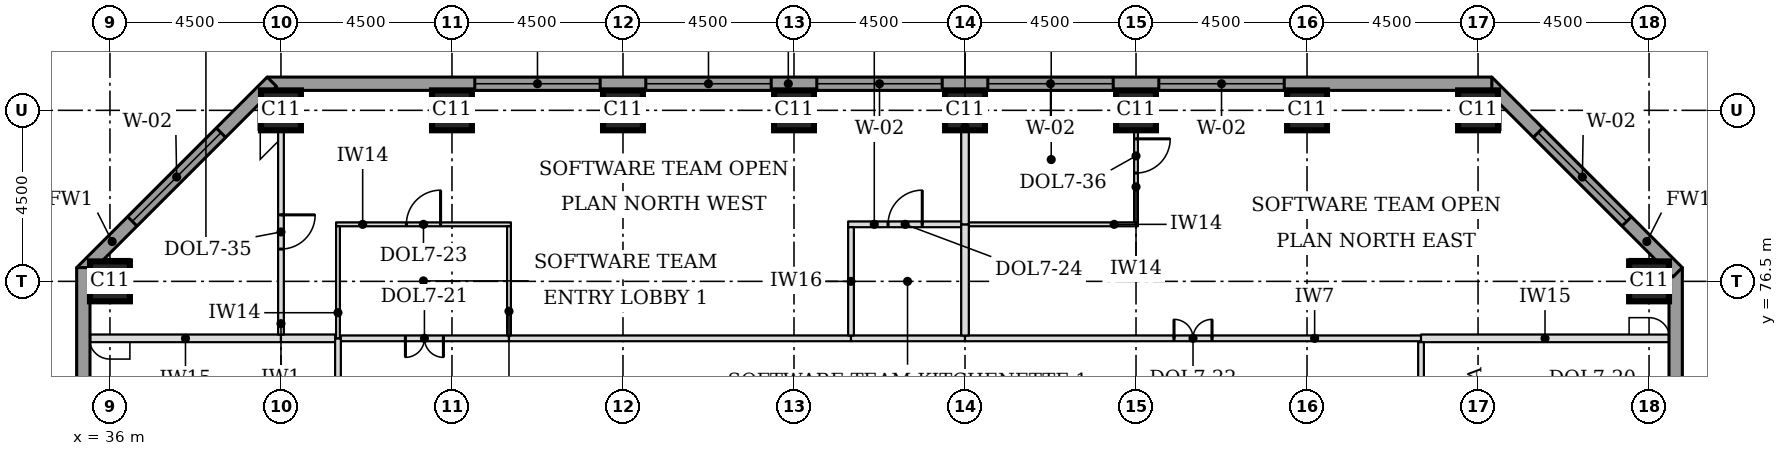
"""IFC4 building model, lengths in metres.
Left out: names, types, materials, properties, quantities, classifications, styles, units other than length and angle.
Written with IfcOpenShell. Run it as: python <this file> out.ifc"""

import sys

from ifc_helpers import new_model, si_unit, direction, frame, frame_2d, origin, origin_2d, place, context, subcontext, project, spatial, rectangle, extrude, element, fill, save


model = new_model("IFC4")
c1 = context("Model", 3, precision=1e-05, world=origin(), true_north=direction((0.0, 1.0)))
c2 = subcontext(c1, "Body", "Model", "MODEL_VIEW")
j1 = project(units=[si_unit("LENGTHUNIT", "METRE"), si_unit("PLANEANGLEUNIT", "RADIAN")], contexts=[c1])
p1 = place(None, origin())
s1 = spatial("IfcSite", under=j1, at=p1, CompositionType="ELEMENT")
p2 = place(p1, origin())
s2 = spatial("IfcBuilding", under=s1, at=p2, CompositionType="ELEMENT")
p3 = place(p2, frame((0.0, 0.0, 127.0)))
s3 = spatial("IfcBuildingStorey", under=s2, at=p3, CompositionType="ELEMENT", Elevation=127.0)
for number, where, z_axis, x_axis in (
    (1, (36.0, 76.5, 0.0), (0.0, 0.0, 1.0), (1.0, 0.0, 0.0)),
    (2, (76.5, 76.5, 0.0), (0.0, 0.0, 1.0), (1.0, 0.0, 0.0)),
    (3, (40.5, 81.0, 0.0), (0.0, 0.0, 1.0), (1.0, 0.0, 0.0)),
    (4, (45.0, 81.0, 0.0), (0.0, 0.0, 1.0), (1.0, 0.0, 0.0)),
    (5, (49.5, 81.0, 0.0), (0.0, 0.0, 1.0), (1.0, 0.0, 0.0)),
    (6, (54.0, 81.0, 0.0), (0.0, 0.0, 1.0), (1.0, 0.0, 0.0)),
    (7, (58.5, 81.0, 0.0), (0.0, 0.0, 1.0), (1.0, 0.0, 0.0)),
    (8, (63.0, 81.0, 0.0), (0.0, 0.0, 1.0), (1.0, 0.0, 0.0)),
    (9, (67.5, 81.0, 0.0), (0.0, 0.0, 1.0), (1.0, 0.0, 0.0)),
    (10, (72.0, 81.0, 0.0), (0.0, 0.0, 1.0), (1.0, 0.0, 0.0)),
):
    element("IfcColumn", number, at=place(p3, frame(where, z_axis=z_axis, x_axis=x_axis)), inside=s3, PredefinedType="COLUMN", context=c2, shape_type="SweptSolid", body=[
        extrude(rectangle(XDim=1.05, YDim=1.05, at=origin_2d()), origin(), (0.0, 0.0, 1.0), 3.7),
    ])
p4 = place(p3, frame((77.2, 44.638, 0.0), z_axis=(0.0, 0.0, 1.0), x_axis=(0.0, 1.0, 0.0)))
e11 = element("IfcWall", 11, at=p4, inside=s3, PredefinedType="STANDARD", context=c2, shape_type="SweptSolid", body=[
    extrude(rectangle(XDim=32.225, YDim=0.35, at=frame_2d((16.112, 0.0))), origin(), (0.0, 0.0, 1.0), 3.525),
])
p5 = place(p4, frame((5.462, 0.0, 0.9)))
e12 = element("IfcOpeningElement", 12, at=p5, cuts=e11, PredefinedType="OPENING", context=c2, shape_type="SweptSolid", body=[
    extrude(rectangle(XDim=3.3, YDim=1.9, at=frame_2d((1.65, 0.95))), frame((0.0, 0.185, 0.0), z_axis=(0.0, -1.0, 0.0), x_axis=(1.0, 0.0, 0.0)), (0.0, 0.0, 1.0), 0.37),
])
p6 = place(p4, frame((9.962, 0.0, 0.9)))
e13 = element("IfcOpeningElement", 13, at=p6, cuts=e11, PredefinedType="OPENING", context=c2, shape_type="SweptSolid", body=[
    extrude(rectangle(XDim=3.3, YDim=1.9, at=frame_2d((1.65, 0.95))), frame((0.0, 0.185, 0.0), z_axis=(0.0, -1.0, 0.0), x_axis=(1.0, 0.0, 0.0)), (0.0, 0.0, 1.0), 0.37),
])
p7 = place(p4, frame((14.462, 0.0, 0.9)))
e14 = element("IfcOpeningElement", 14, at=p7, cuts=e11, PredefinedType="OPENING", context=c2, shape_type="SweptSolid", body=[
    extrude(rectangle(XDim=3.3, YDim=1.9, at=frame_2d((1.65, 0.95))), frame((0.0, 0.185, 0.0), z_axis=(0.0, -1.0, 0.0), x_axis=(1.0, 0.0, 0.0)), (0.0, 0.0, 1.0), 0.37),
])
p8 = place(p4, frame((18.962, 0.0, 0.9)))
e15 = element("IfcOpeningElement", 15, at=p8, cuts=e11, PredefinedType="OPENING", context=c2, shape_type="SweptSolid", body=[
    extrude(rectangle(XDim=3.3, YDim=1.9, at=frame_2d((1.65, 0.95))), frame((0.0, 0.185, 0.0), z_axis=(0.0, -1.0, 0.0), x_axis=(1.0, 0.0, 0.0)), (0.0, 0.0, 1.0), 0.37),
])
p9 = place(p4, frame((23.462, 0.0, 0.9)))
e16 = element("IfcOpeningElement", 16, at=p9, cuts=e11, PredefinedType="OPENING", context=c2, shape_type="SweptSolid", body=[
    extrude(rectangle(XDim=3.3, YDim=1.9, at=frame_2d((1.65, 0.95))), frame((0.0, 0.185, 0.0), z_axis=(0.0, -1.0, 0.0), x_axis=(1.0, 0.0, 0.0)), (0.0, 0.0, 1.0), 0.37),
])
p10 = place(p3, frame((77.251, 76.739, 0.0), z_axis=(0.0, 0.0, 1.0), x_axis=(-0.707106781187, 0.707106781187, 0.0)))
e17 = element("IfcWall", 17, at=p10, inside=s3, PredefinedType="STANDARD", context=c2, shape_type="SweptSolid", body=[
    extrude(rectangle(XDim=7.089, YDim=0.35, at=frame_2d((3.544, 0.0))), origin(), (0.0, 0.0, 1.0), 3.525),
])
p11 = place(p10, frame((1.894, 0.0, 0.9)))
e18 = element("IfcOpeningElement", 18, at=p11, cuts=e17, PredefinedType="OPENING", context=c2, shape_type="SweptSolid", body=[
    extrude(rectangle(XDim=3.3, YDim=1.9, at=frame_2d((1.65, 0.95))), frame((0.0, 0.185, 0.0), z_axis=(0.0, -1.0, 0.0), x_axis=(1.0, 0.0, 0.0)), (0.0, 0.0, 1.0), 0.37),
])
p12 = place(p3, frame((72.362, 81.7, 0.0), z_axis=(0.0, 0.0, 1.0), x_axis=(-1.0, 0.0, 0.0)))
e19 = element("IfcWall", 19, at=p12, inside=s3, PredefinedType="STANDARD", context=c2, shape_type="SweptSolid", body=[
    extrude(rectangle(XDim=32.225, YDim=0.35, at=frame_2d((16.112, 0.0))), origin(), (0.0, 0.0, 1.0), 3.525),
])
p13 = place(p12, frame((5.462, 0.0, 0.9)))
e20 = element("IfcOpeningElement", 20, at=p13, cuts=e19, PredefinedType="OPENING", context=c2, shape_type="SweptSolid", body=[
    extrude(rectangle(XDim=3.3, YDim=1.9, at=frame_2d((1.65, 0.95))), frame((0.0, 0.185, 0.0), z_axis=(0.0, -1.0, 0.0), x_axis=(1.0, 0.0, 0.0)), (0.0, 0.0, 1.0), 0.37),
])
p14 = place(p12, frame((9.962, 0.0, 0.9)))
e21 = element("IfcOpeningElement", 21, at=p14, cuts=e19, PredefinedType="OPENING", context=c2, shape_type="SweptSolid", body=[
    extrude(rectangle(XDim=3.3, YDim=1.9, at=frame_2d((1.65, 0.95))), frame((0.0, 0.185, 0.0), z_axis=(0.0, -1.0, 0.0), x_axis=(1.0, 0.0, 0.0)), (0.0, 0.0, 1.0), 0.37),
])
p15 = place(p12, frame((14.462, 0.0, 0.9)))
e22 = element("IfcOpeningElement", 22, at=p15, cuts=e19, PredefinedType="OPENING", context=c2, shape_type="SweptSolid", body=[
    extrude(rectangle(XDim=3.3, YDim=1.9, at=frame_2d((1.65, 0.95))), frame((0.0, 0.185, 0.0), z_axis=(0.0, -1.0, 0.0), x_axis=(1.0, 0.0, 0.0)), (0.0, 0.0, 1.0), 0.37),
])
p16 = place(p12, frame((18.962, 0.0, 0.9)))
e23 = element("IfcOpeningElement", 23, at=p16, cuts=e19, PredefinedType="OPENING", context=c2, shape_type="SweptSolid", body=[
    extrude(rectangle(XDim=3.3, YDim=1.9, at=frame_2d((1.65, 0.95))), frame((0.0, 0.185, 0.0), z_axis=(0.0, -1.0, 0.0), x_axis=(1.0, 0.0, 0.0)), (0.0, 0.0, 1.0), 0.37),
])
p17 = place(p12, frame((23.462, 0.0, 0.9)))
e24 = element("IfcOpeningElement", 24, at=p17, cuts=e19, PredefinedType="OPENING", context=c2, shape_type="SweptSolid", body=[
    extrude(rectangle(XDim=3.3, YDim=1.9, at=frame_2d((1.65, 0.95))), frame((0.0, 0.185, 0.0), z_axis=(0.0, -1.0, 0.0), x_axis=(1.0, 0.0, 0.0)), (0.0, 0.0, 1.0), 0.37),
])
p18 = place(p3, frame((40.261, 81.751, 0.0), z_axis=(0.0, 0.0, 1.0), x_axis=(-0.707106781187, -0.707106781187, 0.0)))
e25 = element("IfcWall", 25, at=p18, inside=s3, PredefinedType="STANDARD", context=c2, shape_type="SweptSolid", body=[
    extrude(rectangle(XDim=7.089, YDim=0.35, at=frame_2d((3.544, 0.0))), origin(), (0.0, 0.0, 1.0), 3.525),
])
p19 = place(p18, frame((1.894, 0.0, 0.9)))
e26 = element("IfcOpeningElement", 26, at=p19, cuts=e25, PredefinedType="OPENING", context=c2, shape_type="SweptSolid", body=[
    extrude(rectangle(XDim=3.3, YDim=1.9, at=frame_2d((1.65, 0.95))), frame((0.0, 0.185, 0.0), z_axis=(0.0, -1.0, 0.0), x_axis=(1.0, 0.0, 0.0)), (0.0, 0.0, 1.0), 0.37),
])
p20 = place(p3, frame((35.3, 76.862, 0.0), z_axis=(0.0, 0.0, 1.0), x_axis=(0.0, -1.0, 0.0)))
e27 = element("IfcWall", 27, at=p20, inside=s3, PredefinedType="STANDARD", context=c2, shape_type="SweptSolid", body=[
    extrude(rectangle(XDim=13.337, YDim=0.35, at=frame_2d((6.669, 0.0))), origin(), (0.0, 0.0, 1.0), 3.525),
])
p21 = place(p20, frame((9.537, 0.0, 0.9)))
e28 = element("IfcOpeningElement", 28, at=p21, cuts=e27, PredefinedType="OPENING", context=c2, shape_type="SweptSolid", body=[
    extrude(rectangle(XDim=3.3, YDim=1.9, at=frame_2d((1.65, 0.95))), frame((0.0, 0.185, 0.0), z_axis=(0.0, -1.0, 0.0), x_axis=(1.0, 0.0, 0.0)), (0.0, 0.0, 1.0), 0.37),
])
p22 = place(p3, frame((35.475, 75.0, 0.0), z_axis=(0.0, 0.0, 1.0), x_axis=(1.0, 0.0, 0.0)))
e29 = element("IfcWall", 29, at=p22, inside=s3, PredefinedType="PARTITIONING", context=c2, shape_type="SweptSolid", body=[
    extrude(rectangle(XDim=5.025, YDim=0.2, at=frame_2d((2.512, 0.0))), origin(), (0.0, 0.0, 1.0), 3.55),
])
p23 = place(p3, frame((40.5, 75.0, 0.0), z_axis=(0.0, 0.0, 1.0), x_axis=(1.0, 0.0, 0.0)))
e30 = element("IfcWall", 30, at=p23, inside=s3, PredefinedType="PARTITIONING", context=c2, shape_type="SweptSolid", body=[
    extrude(rectangle(XDim=1.425, YDim=0.2, at=frame_2d((0.712, 0.0))), origin(), (0.0, 0.0, 1.0), 3.55),
])
p24 = place(p3, frame((42.075, 75.0, 0.0), z_axis=(0.0, 0.0, 1.0), x_axis=(1.0, 0.0, 0.0)))
e31 = element("IfcWall", 31, at=p24, inside=s3, PredefinedType="PARTITIONING", context=c2, shape_type="SweptSolid", body=[
    extrude(rectangle(XDim=4.425, YDim=0.15, at=frame_2d((2.212, 0.0))), origin(), (0.0, 0.0, 1.0), 3.55),
])
p25 = place(p24, frame((1.7, 0.0, 0.0)))
e32 = element("IfcOpeningElement", 32, at=p25, cuts=e31, PredefinedType="OPENING", context=c2, shape_type="SweptSolid", body=[
    extrude(rectangle(XDim=1.0, YDim=2.1, at=frame_2d((0.5, 1.05))), frame((0.0, 0.085, 0.0), z_axis=(0.0, -1.0, 0.0), x_axis=(1.0, 0.0, 0.0)), (0.0, 0.0, 1.0), 0.17),
])
p26 = place(p3, frame((46.5, 75.0, 0.0), z_axis=(0.0, 0.0, 1.0), x_axis=(1.0, 0.0, 0.0)))
e33 = element("IfcWall", 33, at=p26, inside=s3, PredefinedType="PARTITIONING", context=c2, shape_type="SweptSolid", body=[
    extrude(rectangle(XDim=9.0, YDim=0.15, at=frame_2d((4.5, 0.0))), origin(), (0.0, 0.0, 1.0), 3.55),
])
p27 = place(p3, frame((55.5, 75.0, 0.0), z_axis=(0.0, 0.0, 1.0), x_axis=(1.0, 0.0, 0.0)))
e34 = element("IfcWall", 34, at=p27, inside=s3, PredefinedType="PARTITIONING", context=c2, shape_type="SweptSolid", body=[
    extrude(rectangle(XDim=3.0, YDim=0.15, at=frame_2d((1.5, 0.0))), origin(), (0.0, 0.0, 1.0), 3.55),
])
p28 = place(p3, frame((58.5, 75.0, 0.0), z_axis=(0.0, 0.0, 1.0), x_axis=(1.0, 0.0, 0.0)))
e35 = element("IfcWall", 35, at=p28, inside=s3, PredefinedType="PARTITIONING", context=c2, shape_type="SweptSolid", body=[
    extrude(rectangle(XDim=12.0, YDim=0.15, at=frame_2d((6.0, 0.0))), origin(), (0.0, 0.0, 1.0), 3.55),
])
p29 = place(p28, frame((5.5, 0.0, 0.0)))
e36 = element("IfcOpeningElement", 36, at=p29, cuts=e35, PredefinedType="OPENING", context=c2, shape_type="SweptSolid", body=[
    extrude(rectangle(XDim=1.0, YDim=2.1, at=frame_2d((0.5, 1.05))), frame((0.0, 0.085, 0.0), z_axis=(0.0, -1.0, 0.0), x_axis=(1.0, 0.0, 0.0)), (0.0, 0.0, 1.0), 0.17),
])
p30 = place(p3, frame((70.5, 75.0, 0.0), z_axis=(0.0, 0.0, 1.0), x_axis=(1.0, 0.0, 0.0)))
e37 = element("IfcWall", 37, at=p30, inside=s3, PredefinedType="PARTITIONING", context=c2, shape_type="SweptSolid", body=[
    extrude(rectangle(XDim=6.525, YDim=0.2, at=frame_2d((3.262, 0.0))), origin(), (0.0, 0.0, 1.0), 3.55),
])
p31 = place(p3, frame((41.95, 78.0, 0.0), z_axis=(0.0, 0.0, 1.0), x_axis=(1.0, 0.0, 0.0)))
e38 = element("IfcWall", 38, at=p31, inside=s3, PredefinedType="PARTITIONING", context=c2, shape_type="SweptSolid", body=[
    extrude(rectangle(XDim=4.6, YDim=0.1, at=frame_2d((2.3, 0.0))), origin(), (0.0, 0.0, 1.0), 3.55),
])
p32 = place(p31, frame((1.85, 0.0, 0.0)))
e39 = element("IfcOpeningElement", 39, at=p32, cuts=e38, PredefinedType="OPENING", context=c2, shape_type="SweptSolid", body=[
    extrude(rectangle(XDim=0.9, YDim=2.1, at=frame_2d((0.45, 1.05))), frame((0.0, 0.06, 0.0), z_axis=(0.0, -1.0, 0.0), x_axis=(1.0, 0.0, 0.0)), (0.0, 0.0, 1.0), 0.12),
])
p33 = place(p3, frame((55.425, 78.0, 0.0), z_axis=(0.0, 0.0, 1.0), x_axis=(1.0, 0.0, 0.0)))
e40 = element("IfcWall", 40, at=p33, inside=s3, PredefinedType="PARTITIONING", context=c2, shape_type="SweptSolid", body=[
    extrude(rectangle(XDim=2.975, YDim=0.15, at=frame_2d((1.487, 0.0))), origin(), (0.0, 0.0, 1.0), 3.55),
])
p34 = place(p33, frame((1.05, 0.0, 0.0)))
e41 = element("IfcOpeningElement", 41, at=p34, cuts=e40, PredefinedType="OPENING", context=c2, shape_type="SweptSolid", body=[
    extrude(rectangle(XDim=0.9, YDim=2.1, at=frame_2d((0.45, 1.05))), frame((0.0, 0.085, 0.0), z_axis=(0.0, -1.0, 0.0), x_axis=(1.0, 0.0, 0.0)), (0.0, 0.0, 1.0), 0.17),
])
p35 = place(p3, frame((58.6, 78.0, 0.0), z_axis=(0.0, 0.0, 1.0), x_axis=(1.0, 0.0, 0.0)))
e42 = element("IfcWall", 42, at=p35, inside=s3, PredefinedType="PARTITIONING", context=c2, shape_type="SweptSolid", body=[
    extrude(rectangle(XDim=4.45, YDim=0.1, at=frame_2d((2.225, 0.0))), origin(), (0.0, 0.0, 1.0), 3.55),
])
p36 = place(p3, frame((42.0, 57.075, 0.0), z_axis=(0.0, 0.0, 1.0), x_axis=(0.0, 1.0, 0.0)))
e43 = element("IfcWall", 43, at=p36, inside=s3, PredefinedType="PARTITIONING", context=c2, shape_type="SweptSolid", body=[
    extrude(rectangle(XDim=17.925, YDim=0.15, at=frame_2d((8.962, 0.0))), origin(), (0.0, 0.0, 1.0), 3.55),
])
p37 = place(p3, frame((70.5, 63.0, 0.0), z_axis=(0.0, 0.0, 1.0), x_axis=(0.0, 1.0, 0.0)))
e44 = element("IfcWall", 44, at=p37, inside=s3, PredefinedType="PARTITIONING", context=c2, shape_type="SweptSolid", body=[
    extrude(rectangle(XDim=11.9, YDim=0.15, at=frame_2d((5.95, 0.0))), origin(), (0.0, 0.0, 1.0), 3.55),
])
p38 = place(p37, frame((5.45, 0.0, 0.0)))
e45 = element("IfcOpeningElement", 45, at=p38, cuts=e44, PredefinedType="OPENING", context=c2, shape_type="SweptSolid", body=[
    extrude(rectangle(XDim=1.0, YDim=2.1, at=frame_2d((0.5, 1.05))), frame((0.0, 0.085, 0.0), z_axis=(0.0, -1.0, 0.0), x_axis=(1.0, 0.0, 0.0)), (0.0, 0.0, 1.0), 0.17),
])
p39 = place(p3, frame((42.0, 75.0, 0.0), z_axis=(0.0, 0.0, 1.0), x_axis=(0.0, 1.0, 0.0)))
e46 = element("IfcWall", 46, at=p39, inside=s3, PredefinedType="PARTITIONING", context=c2, shape_type="SweptSolid", body=[
    extrude(rectangle(XDim=2.95, YDim=0.1, at=frame_2d((1.475, 0.0))), origin(), (0.0, 0.0, 1.0), 3.55),
])
p40 = place(p3, frame((46.5, 75.075, 0.0), z_axis=(0.0, 0.0, 1.0), x_axis=(0.0, 1.0, 0.0)))
e47 = element("IfcWall", 47, at=p40, inside=s3, PredefinedType="PARTITIONING", context=c2, shape_type="SweptSolid", body=[
    extrude(rectangle(XDim=2.875, YDim=0.1, at=frame_2d((1.438, 0.0))), origin(), (0.0, 0.0, 1.0), 3.022),
])
p41 = place(p3, frame((55.5, 75.075, 0.0), z_axis=(0.0, 0.0, 1.0), x_axis=(0.0, 1.0, 0.0)))
e48 = element("IfcWall", 48, at=p41, inside=s3, PredefinedType="PARTITIONING", context=c2, shape_type="SweptSolid", body=[
    extrude(rectangle(XDim=2.85, YDim=0.15, at=frame_2d((1.425, 0.0))), origin(), (0.0, 0.0, 1.0), 3.55),
])
p42 = place(p3, frame((58.5, 75.075, 0.0), z_axis=(0.0, 0.0, 1.0), x_axis=(0.0, 1.0, 0.0)))
e49 = element("IfcWall", 49, at=p42, inside=s3, PredefinedType="PARTITIONING", context=c2, shape_type="SweptSolid", body=[
    extrude(rectangle(XDim=2.925, YDim=0.2, at=frame_2d((1.462, 0.0))), origin(), (0.0, 0.0, 1.0), 3.55),
])
p43 = place(p3, frame((40.5, 75.1, 0.0), z_axis=(0.0, 0.0, 1.0), x_axis=(0.0, 1.0, 0.0)))
e50 = element("IfcWall", 50, at=p43, inside=s3, PredefinedType="PARTITIONING", context=c2, shape_type="SweptSolid", body=[
    extrude(rectangle(XDim=5.375, YDim=0.15, at=frame_2d((2.688, 0.0))), origin(), (0.0, 0.0, 1.0), 3.55),
])
p44 = place(p43, frame((2.25, 0.0, 0.0)))
e51 = element("IfcOpeningElement", 51, at=p44, cuts=e50, PredefinedType="OPENING", context=c2, shape_type="SweptSolid", body=[
    extrude(rectangle(XDim=0.9, YDim=2.1, at=frame_2d((0.45, 1.05))), frame((0.0, 0.085, 0.0), z_axis=(0.0, -1.0, 0.0), x_axis=(1.0, 0.0, 0.0)), (0.0, 0.0, 1.0), 0.17),
])
p45 = place(p3, frame((58.5, 78.0, 0.0), z_axis=(0.0, 0.0, 1.0), x_axis=(0.0, 1.0, 0.0)))
e52 = element("IfcWall", 52, at=p45, inside=s3, PredefinedType="PARTITIONING", context=c2, shape_type="SweptSolid", body=[
    extrude(rectangle(XDim=3.525, YDim=0.2, at=frame_2d((1.762, 0.0))), origin(), (0.0, 0.0, 1.0), 3.55),
])
p46 = place(p3, frame((63.0, 78.05, 0.0), z_axis=(0.0, 0.0, 1.0), x_axis=(0.0, 1.0, 0.0)))
e53 = element("IfcWall", 53, at=p46, inside=s3, PredefinedType="PARTITIONING", context=c2, shape_type="SweptSolid", body=[
    extrude(rectangle(XDim=3.475, YDim=0.1, at=frame_2d((1.737, 0.0))), origin(), (0.0, 0.0, 1.0), 3.55),
])
p47 = place(p46, frame((1.3, 0.0, 0.0)))
e54 = element("IfcOpeningElement", 54, at=p47, cuts=e53, PredefinedType="OPENING", context=c2, shape_type="SweptSolid", body=[
    extrude(rectangle(XDim=0.9, YDim=2.1, at=frame_2d((0.45, 1.05))), frame((0.0, 0.06, 0.0), z_axis=(0.0, -1.0, 0.0), x_axis=(1.0, 0.0, 0.0)), (0.0, 0.0, 1.0), 0.12),
])
p48 = place(p11, origin())
e55 = element("IfcWindow", 55, at=p48, inside=s3, PartitioningType="SINGLE_PANEL", PredefinedType="WINDOW", context=c2, shape_type="SweptSolid", body=[
    extrude(rectangle(XDim=3.3, YDim=1.9, at=frame_2d((1.65, 0.95))), frame((0.0, 0.085, 0.0), z_axis=(0.0, -1.0, 0.0), x_axis=(1.0, 0.0, 0.0)), (0.0, 0.0, 1.0), 0.06),
])
fill(e18, e55)
p49 = place(p13, origin())
e56 = element("IfcWindow", 56, at=p49, inside=s3, PartitioningType="SINGLE_PANEL", PredefinedType="WINDOW", context=c2, shape_type="SweptSolid", body=[
    extrude(rectangle(XDim=3.3, YDim=1.9, at=frame_2d((1.65, 0.95))), frame((0.0, 0.085, 0.0), z_axis=(0.0, -1.0, 0.0), x_axis=(1.0, 0.0, 0.0)), (0.0, 0.0, 1.0), 0.06),
])
fill(e20, e56)
p50 = place(p14, origin())
e57 = element("IfcWindow", 57, at=p50, inside=s3, PartitioningType="SINGLE_PANEL", PredefinedType="WINDOW", context=c2, shape_type="SweptSolid", body=[
    extrude(rectangle(XDim=3.3, YDim=1.9, at=frame_2d((1.65, 0.95))), frame((0.0, 0.085, 0.0), z_axis=(0.0, -1.0, 0.0), x_axis=(1.0, 0.0, 0.0)), (0.0, 0.0, 1.0), 0.06),
])
fill(e21, e57)
p51 = place(p15, origin())
e58 = element("IfcWindow", 58, at=p51, inside=s3, PartitioningType="SINGLE_PANEL", PredefinedType="WINDOW", context=c2, shape_type="SweptSolid", body=[
    extrude(rectangle(XDim=3.3, YDim=1.9, at=frame_2d((1.65, 0.95))), frame((0.0, 0.085, 0.0), z_axis=(0.0, -1.0, 0.0), x_axis=(1.0, 0.0, 0.0)), (0.0, 0.0, 1.0), 0.06),
])
fill(e22, e58)
p52 = place(p16, origin())
e59 = element("IfcWindow", 59, at=p52, inside=s3, PartitioningType="SINGLE_PANEL", PredefinedType="WINDOW", context=c2, shape_type="SweptSolid", body=[
    extrude(rectangle(XDim=3.3, YDim=1.9, at=frame_2d((1.65, 0.95))), frame((0.0, 0.085, 0.0), z_axis=(0.0, -1.0, 0.0), x_axis=(1.0, 0.0, 0.0)), (0.0, 0.0, 1.0), 0.06),
])
fill(e23, e59)
p53 = place(p17, origin())
e60 = element("IfcWindow", 60, at=p53, inside=s3, PartitioningType="SINGLE_PANEL", PredefinedType="WINDOW", context=c2, shape_type="SweptSolid", body=[
    extrude(rectangle(XDim=3.3, YDim=1.9, at=frame_2d((1.65, 0.95))), frame((0.0, 0.085, 0.0), z_axis=(0.0, -1.0, 0.0), x_axis=(1.0, 0.0, 0.0)), (0.0, 0.0, 1.0), 0.06),
])
fill(e24, e60)
p54 = place(p19, origin())
e61 = element("IfcWindow", 61, at=p54, inside=s3, PartitioningType="SINGLE_PANEL", PredefinedType="WINDOW", context=c2, shape_type="SweptSolid", body=[
    extrude(rectangle(XDim=3.3, YDim=1.9, at=frame_2d((1.65, 0.95))), frame((0.0, 0.085, 0.0), z_axis=(0.0, -1.0, 0.0), x_axis=(1.0, 0.0, 0.0)), (0.0, 0.0, 1.0), 0.06),
])
fill(e26, e61)
p55 = place(p25, frame((1.0, 0.0, 0.0), z_axis=(0.0, 0.0, 1.0), x_axis=(-1.0, 0.0, 0.0)))
e62 = element("IfcDoor", 62, at=p55, inside=s3, OperationType="DOUBLE_DOOR_SINGLE_SWING", PredefinedType="DOOR", context=c2, shape_type="SweptSolid", body=[
    extrude(rectangle(XDim=1.0, YDim=2.1, at=frame_2d((0.5, 1.05))), frame((0.0, 0.025, 0.0), z_axis=(0.0, -1.0, 0.0), x_axis=(1.0, 0.0, 0.0)), (0.0, 0.0, 1.0), 0.05),
])
fill(e32, e62)
p56 = place(p32, origin())
e63 = element("IfcDoor", 63, at=p56, inside=s3, OperationType="SINGLE_SWING_RIGHT", PredefinedType="DOOR", context=c2, shape_type="SweptSolid", body=[
    extrude(rectangle(XDim=0.9, YDim=2.1, at=frame_2d((0.45, 1.05))), frame((0.0, 0.025, 0.0), z_axis=(0.0, -1.0, 0.0), x_axis=(1.0, 0.0, 0.0)), (0.0, 0.0, 1.0), 0.05),
])
fill(e39, e63)
p57 = place(p34, origin())
e64 = element("IfcDoor", 64, at=p57, inside=s3, OperationType="SINGLE_SWING_RIGHT", PredefinedType="DOOR", context=c2, shape_type="SweptSolid", body=[
    extrude(rectangle(XDim=0.9, YDim=2.1, at=frame_2d((0.45, 1.05))), frame((0.0, 0.025, 0.0), z_axis=(0.0, -1.0, 0.0), x_axis=(1.0, 0.0, 0.0)), (0.0, 0.0, 1.0), 0.05),
])
fill(e41, e64)
p58 = place(p44, frame((0.9, 0.0, 0.0), z_axis=(0.0, 0.0, 1.0), x_axis=(-1.0, 0.0, 0.0)))
e65 = element("IfcDoor", 65, at=p58, inside=s3, OperationType="SINGLE_SWING_LEFT", PredefinedType="DOOR", context=c2, shape_type="SweptSolid", body=[
    extrude(rectangle(XDim=0.9, YDim=2.1, at=frame_2d((0.45, 1.05))), frame((0.0, 0.025, 0.0), z_axis=(0.0, -1.0, 0.0), x_axis=(1.0, 0.0, 0.0)), (0.0, 0.0, 1.0), 0.05),
])
fill(e51, e65)
p59 = place(p29, origin())
e66 = element("IfcDoor", 66, at=p59, inside=s3, OperationType="DOUBLE_DOOR_SINGLE_SWING", PredefinedType="DOOR", context=c2, shape_type="SweptSolid", body=[
    extrude(rectangle(XDim=1.0, YDim=2.1, at=frame_2d((0.5, 1.05))), frame((0.0, 0.025, 0.0), z_axis=(0.0, -1.0, 0.0), x_axis=(1.0, 0.0, 0.0)), (0.0, 0.0, 1.0), 0.05),
])
fill(e36, e66)
p60 = place(p47, frame((0.9, 0.0, 0.0), z_axis=(0.0, 0.0, 1.0), x_axis=(-1.0, 0.0, 0.0)))
e67 = element("IfcDoor", 67, at=p60, inside=s3, OperationType="SINGLE_SWING_LEFT", PredefinedType="DOOR", context=c2, shape_type="SweptSolid", body=[
    extrude(rectangle(XDim=0.9, YDim=2.1, at=frame_2d((0.45, 1.05))), frame((0.0, 0.025, 0.0), z_axis=(0.0, -1.0, 0.0), x_axis=(1.0, 0.0, 0.0)), (0.0, 0.0, 1.0), 0.05),
])
fill(e54, e67)
save(model, sys.argv[1])
